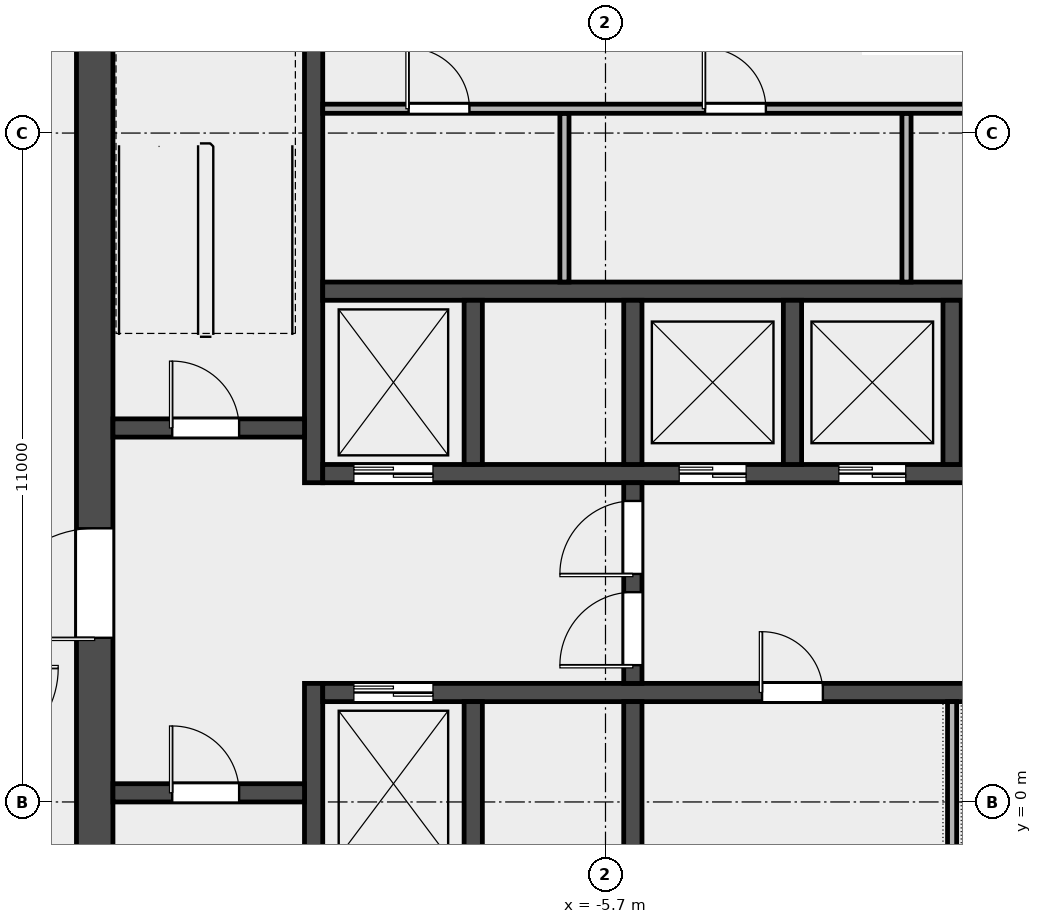
"""IFC4 building model, lengths in metres.
Left out: names, types, materials, properties, quantities, classifications, styles, units other than length and angle.
Written with IfcOpenShell. Run it as: python <this file> out.ifc"""

import sys

from ifc_helpers import new_model, si_unit, direction, frame, frame_2d, origin, place, context, subcontext, project, spatial, rectangle, extrude, element, fill, save


model = new_model("IFC4")
c1 = context("Model", 3, precision=1e-05, world=origin(), true_north=direction((0.0, 1.0)))
c2 = subcontext(c1, "Body", "Model", "MODEL_VIEW")
j1 = project(units=[si_unit("LENGTHUNIT", "METRE"), si_unit("PLANEANGLEUNIT", "RADIAN")], contexts=[c1])
p1 = place(None, origin())
s1 = spatial("IfcSite", under=j1, at=p1, CompositionType="ELEMENT")
p2 = place(p1, origin())
s2 = spatial("IfcBuilding", under=s1, at=p2, CompositionType="ELEMENT")
p3 = place(p2, frame((0.0, 0.0, 303.4)))
s3 = spatial("IfcBuildingStorey", under=s2, at=p3, CompositionType="ELEMENT", Elevation=303.4)
p4 = place(p3, frame((-14.1, -6.6, 0.0), z_axis=(0.0, 0.0, 1.0), x_axis=(0.0, 1.0, 0.0)))
e1 = element("IfcWall", 1, at=p4, inside=s3, PredefinedType="SHEAR", context=c2, shape_type="SweptSolid", body=[
    extrude(rectangle(XDim=19.5, YDim=0.6, at=frame_2d((9.75, 0.0))), origin(), (0.0, 0.0, 1.0), 3.7),
])
p5 = place(p4, frame((9.3, 0.0, 0.0)))
e2 = element("IfcOpeningElement", 2, at=p5, cuts=e1, PredefinedType="OPENING", context=c2, shape_type="SweptSolid", body=[
    extrude(rectangle(XDim=1.8, YDim=2.1, at=frame_2d((0.9, 1.05))), frame((0.0, 0.312, 0.0), z_axis=(0.0, -1.0, 0.0), x_axis=(1.0, 0.0, 0.0)), (0.0, 0.0, 1.0), 0.624),
])
p6 = place(p3, frame((-10.5, -6.6, 0.0), z_axis=(0.0, 0.0, 1.0), x_axis=(0.0, 1.0, 0.0)))
e3 = element("IfcWall", 3, at=p6, inside=s3, PredefinedType="SHEAR", context=c2, shape_type="SweptSolid", body=[
    extrude(rectangle(XDim=8.55, YDim=0.3, at=frame_2d((4.275, 0.0))), origin(), (0.0, 0.0, 1.0), 3.7),
])
p7 = place(p3, frame((-10.5, 5.25, 0.0), z_axis=(0.0, 0.0, 1.0), x_axis=(0.0, 1.0, 0.0)))
e4 = element("IfcWall", 4, at=p7, inside=s3, PredefinedType="SHEAR", context=c2, shape_type="SweptSolid", body=[
    extrude(rectangle(XDim=7.65, YDim=0.3, at=frame_2d((3.825, 0.0))), origin(), (0.0, 0.0, 1.0), 3.7),
])
p8 = place(p3, frame((-13.8, 0.15, 0.0), z_axis=(0.0, 0.0, 1.0), x_axis=(1.0, 0.0, 0.0)))
e5 = element("IfcWall", 5, at=p8, inside=s3, PredefinedType="SOLIDWALL", context=c2, shape_type="SweptSolid", body=[
    extrude(rectangle(XDim=3.15, YDim=0.3, at=frame_2d((1.575, 0.0))), origin(), (0.0, 0.0, 1.0), 3.7),
])
p9 = place(p8, frame((0.975, 0.0, 0.0)))
e6 = element("IfcOpeningElement", 6, at=p9, cuts=e5, PredefinedType="OPENING", context=c2, shape_type="SweptSolid", body=[
    extrude(rectangle(XDim=1.1, YDim=2.1, at=frame_2d((0.55, 1.05))), frame((0.0, 0.162, 0.0), z_axis=(0.0, -1.0, 0.0), x_axis=(1.0, 0.0, 0.0)), (0.0, 0.0, 1.0), 0.324),
])
p10 = place(p3, frame((-13.8, 6.15, 0.0), z_axis=(0.0, 0.0, 1.0), x_axis=(1.0, 0.0, 0.0)))
e7 = element("IfcWall", 7, at=p10, inside=s3, PredefinedType="SOLIDWALL", context=c2, shape_type="SweptSolid", body=[
    extrude(rectangle(XDim=3.15, YDim=0.3, at=frame_2d((1.575, 0.0))), origin(), (0.0, 0.0, 1.0), 3.7),
])
p11 = place(p10, frame((0.975, 0.0, 0.0)))
e8 = element("IfcOpeningElement", 8, at=p11, cuts=e7, PredefinedType="OPENING", context=c2, shape_type="SweptSolid", body=[
    extrude(rectangle(XDim=1.1, YDim=2.1, at=frame_2d((0.55, 1.05))), frame((0.0, 0.162, 0.0), z_axis=(0.0, -1.0, 0.0), x_axis=(1.0, 0.0, 0.0)), (0.0, 0.0, 1.0), 0.324),
])
p12 = place(p3, frame((-10.35, 1.8, 0.0), z_axis=(0.0, 0.0, 1.0), x_axis=(1.0, 0.0, 0.0)))
e9 = element("IfcWall", 9, at=p12, inside=s3, PredefinedType="SOLIDWALL", context=c2, shape_type="SweptSolid", body=[
    extrude(rectangle(XDim=20.7, YDim=0.3, at=frame_2d((10.35, 0.0))), origin(), (0.0, 0.0, 1.0), 3.7),
])
p13 = place(p12, frame((0.512, 0.0, 0.0)))
e10 = element("IfcOpeningElement", 10, at=p13, cuts=e9, PredefinedType="OPENING", context=c2, shape_type="SweptSolid", body=[
    extrude(rectangle(XDim=1.3, YDim=2.1, at=frame_2d((0.65, 1.05))), frame((0.0, 0.162, 0.0), z_axis=(0.0, -1.0, 0.0), x_axis=(1.0, 0.0, 0.0)), (0.0, 0.0, 1.0), 0.324),
])
p14 = place(p12, frame((7.225, 0.0, 0.0)))
e11 = element("IfcOpeningElement", 11, at=p14, cuts=e9, PredefinedType="OPENING", context=c2, shape_type="SweptSolid", body=[
    extrude(rectangle(XDim=1.0, YDim=2.1, at=frame_2d((0.5, 1.05))), frame((0.0, 0.162, 0.0), z_axis=(0.0, -1.0, 0.0), x_axis=(1.0, 0.0, 0.0)), (0.0, 0.0, 1.0), 0.324),
])
p15 = place(p12, frame((11.163, 0.0, 0.0)))
e12 = element("IfcOpeningElement", 12, at=p15, cuts=e9, PredefinedType="OPENING", context=c2, shape_type="SweptSolid", body=[
    extrude(rectangle(XDim=1.0, YDim=2.1, at=frame_2d((0.5, 1.05))), frame((0.0, 0.162, 0.0), z_axis=(0.0, -1.0, 0.0), x_axis=(1.0, 0.0, 0.0)), (0.0, 0.0, 1.0), 0.324),
])
p16 = place(p12, frame((16.413, 0.0, 0.0)))
e13 = element("IfcOpeningElement", 13, at=p16, cuts=e9, PredefinedType="OPENING", context=c2, shape_type="SweptSolid", body=[
    extrude(rectangle(XDim=1.0, YDim=2.1, at=frame_2d((0.5, 1.05))), frame((0.0, 0.162, 0.0), z_axis=(0.0, -1.0, 0.0), x_axis=(1.0, 0.0, 0.0)), (0.0, 0.0, 1.0), 0.324),
])
p17 = place(p3, frame((-10.35, 5.4, 0.0), z_axis=(0.0, 0.0, 1.0), x_axis=(1.0, 0.0, 0.0)))
e14 = element("IfcWall", 14, at=p17, inside=s3, PredefinedType="SOLIDWALL", context=c2, shape_type="SweptSolid", body=[
    extrude(rectangle(XDim=20.7, YDim=0.3, at=frame_2d((10.35, 0.0))), origin(), (0.0, 0.0, 1.0), 3.7),
])
p18 = place(p17, frame((0.512, 0.0, 0.0)))
e15 = element("IfcOpeningElement", 15, at=p18, cuts=e14, PredefinedType="OPENING", context=c2, shape_type="SweptSolid", body=[
    extrude(rectangle(XDim=1.3, YDim=2.1, at=frame_2d((0.65, 1.05))), frame((0.0, 0.162, 0.0), z_axis=(0.0, -1.0, 0.0), x_axis=(1.0, 0.0, 0.0)), (0.0, 0.0, 1.0), 0.324),
])
p19 = place(p17, frame((5.863, 0.0, 0.0)))
e16 = element("IfcOpeningElement", 16, at=p19, cuts=e14, PredefinedType="OPENING", context=c2, shape_type="SweptSolid", body=[
    extrude(rectangle(XDim=1.1, YDim=2.1, at=frame_2d((0.55, 1.05))), frame((0.0, 0.162, 0.0), z_axis=(0.0, -1.0, 0.0), x_axis=(1.0, 0.0, 0.0)), (0.0, 0.0, 1.0), 0.324),
])
p20 = place(p17, frame((8.488, 0.0, 0.0)))
e17 = element("IfcOpeningElement", 17, at=p20, cuts=e14, PredefinedType="OPENING", context=c2, shape_type="SweptSolid", body=[
    extrude(rectangle(XDim=1.1, YDim=2.1, at=frame_2d((0.55, 1.05))), frame((0.0, 0.162, 0.0), z_axis=(0.0, -1.0, 0.0), x_axis=(1.0, 0.0, 0.0)), (0.0, 0.0, 1.0), 0.324),
])
p21 = place(p17, frame((11.113, 0.0, 0.0)))
e18 = element("IfcOpeningElement", 18, at=p21, cuts=e14, PredefinedType="OPENING", context=c2, shape_type="SweptSolid", body=[
    extrude(rectangle(XDim=1.1, YDim=2.1, at=frame_2d((0.55, 1.05))), frame((0.0, 0.162, 0.0), z_axis=(0.0, -1.0, 0.0), x_axis=(1.0, 0.0, 0.0)), (0.0, 0.0, 1.0), 0.324),
])
p22 = place(p17, frame((13.738, 0.0, 0.0)))
e19 = element("IfcOpeningElement", 19, at=p22, cuts=e14, PredefinedType="OPENING", context=c2, shape_type="SweptSolid", body=[
    extrude(rectangle(XDim=1.1, YDim=2.1, at=frame_2d((0.55, 1.05))), frame((0.0, 0.162, 0.0), z_axis=(0.0, -1.0, 0.0), x_axis=(1.0, 0.0, 0.0)), (0.0, 0.0, 1.0), 0.324),
])
p23 = place(p17, frame((16.363, 0.0, 0.0)))
e20 = element("IfcOpeningElement", 20, at=p23, cuts=e14, PredefinedType="OPENING", context=c2, shape_type="SweptSolid", body=[
    extrude(rectangle(XDim=1.1, YDim=2.1, at=frame_2d((0.55, 1.05))), frame((0.0, 0.162, 0.0), z_axis=(0.0, -1.0, 0.0), x_axis=(1.0, 0.0, 0.0)), (0.0, 0.0, 1.0), 0.324),
])
p24 = place(p17, frame((18.988, 0.0, 0.0)))
e21 = element("IfcOpeningElement", 21, at=p24, cuts=e14, PredefinedType="OPENING", context=c2, shape_type="SweptSolid", body=[
    extrude(rectangle(XDim=1.1, YDim=2.1, at=frame_2d((0.55, 1.05))), frame((0.0, 0.162, 0.0), z_axis=(0.0, -1.0, 0.0), x_axis=(1.0, 0.0, 0.0)), (0.0, 0.0, 1.0), 0.324),
])
p25 = place(p3, frame((-10.35, 8.4, 0.0), z_axis=(0.0, 0.0, 1.0), x_axis=(1.0, 0.0, 0.0)))
e22 = element("IfcWall", 22, at=p25, inside=s3, PredefinedType="SOLIDWALL", context=c2, shape_type="SweptSolid", body=[
    extrude(rectangle(XDim=20.7, YDim=0.3, at=frame_2d((10.35, 0.0))), origin(), (0.0, 0.0, 1.0), 3.7),
])
for number, where, z_axis, x_axis in (
    (23, (-7.875, -1.05, 0.0), (0.0, 0.0, 1.0), (0.0, 1.0, 0.0)),
    (24, (-5.25, -1.05, 0.0), (0.0, 0.0, 1.0), (0.0, 1.0, 0.0)),
    (25, (-7.875, 5.55, 0.0), (0.0, 0.0, 1.0), (0.0, 1.0, 0.0)),
    (26, (-5.25, 5.55, 0.0), (0.0, 0.0, 1.0), (0.0, 1.0, 0.0)),
    (27, (-2.625, 5.55, 0.0), (0.0, 0.0, 1.0), (0.0, 1.0, 0.0)),
    (28, (0.0, 5.55, 0.0), (0.0, 0.0, 1.0), (0.0, 1.0, 0.0)),
):
    element("IfcWall", number, at=place(p3, frame(where, z_axis=z_axis, x_axis=x_axis)), inside=s3, PredefinedType="SOLIDWALL", context=c2, shape_type="SweptSolid", body=[
        extrude(rectangle(XDim=2.7, YDim=0.3, at=frame_2d((1.35, 0.0))), origin(), (0.0, 0.0, 1.0), 3.7),
    ])
p26 = place(p3, frame((-5.25, 1.95, 0.0), z_axis=(0.0, 0.0, 1.0), x_axis=(0.0, 1.0, 0.0)))
e29 = element("IfcWall", 29, at=p26, inside=s3, PredefinedType="SOLIDWALL", context=c2, shape_type="SweptSolid", body=[
    extrude(rectangle(XDim=3.3, YDim=0.3, at=frame_2d((1.65, 0.0))), origin(), (0.0, 0.0, 1.0), 3.7),
])
p27 = place(p26, frame((0.3, 0.0, 0.0)))
e30 = element("IfcOpeningElement", 30, at=p27, cuts=e29, PredefinedType="OPENING", context=c2, shape_type="SweptSolid", body=[
    extrude(rectangle(XDim=1.2, YDim=2.1, at=frame_2d((0.6, 1.05))), frame((0.0, 0.162, 0.0), z_axis=(0.0, -1.0, 0.0), x_axis=(1.0, 0.0, 0.0)), (0.0, 0.0, 1.0), 0.324),
])
p28 = place(p26, frame((1.8, 0.0, 0.0)))
e31 = element("IfcOpeningElement", 31, at=p28, cuts=e29, PredefinedType="OPENING", context=c2, shape_type="SweptSolid", body=[
    extrude(rectangle(XDim=1.2, YDim=2.1, at=frame_2d((0.6, 1.05))), frame((0.0, 0.162, 0.0), z_axis=(0.0, -1.0, 0.0), x_axis=(1.0, 0.0, 0.0)), (0.0, 0.0, 1.0), 0.324),
])
for number, where, z_axis, x_axis in (
    (32, (-6.375, 8.55, 0.0), (0.0, 0.0, 1.0), (0.0, 1.0, 0.0)),
    (33, (-0.75, 8.55, 0.0), (0.0, 0.0, 1.0), (0.0, 1.0, 0.0)),
):
    element("IfcWall", number, at=place(p3, frame(where, z_axis=z_axis, x_axis=x_axis)), inside=s3, PredefinedType="PARTITIONING", context=c2, shape_type="SweptSolid", body=[
        extrude(rectangle(XDim=2.775, YDim=0.15, at=frame_2d((1.387, 0.0))), origin(), (0.0, 0.0, 1.0), 3.7),
    ])
p29 = place(p3, frame((-10.35, 11.4, 0.0), z_axis=(0.0, 0.0, 1.0), x_axis=(1.0, 0.0, 0.0)))
e34 = element("IfcWall", 34, at=p29, inside=s3, PredefinedType="PARTITIONING", context=c2, shape_type="SweptSolid", body=[
    extrude(rectangle(XDim=20.7, YDim=0.15, at=frame_2d((10.35, 0.0))), origin(), (0.0, 0.0, 1.0), 3.7),
])
p30 = place(p29, frame((1.413, 0.0, 0.0)))
e35 = element("IfcOpeningElement", 35, at=p30, cuts=e34, PredefinedType="OPENING", context=c2, shape_type="SweptSolid", body=[
    extrude(rectangle(XDim=1.0, YDim=2.1, at=frame_2d((0.5, 1.05))), frame((0.0, 0.087, 0.0), z_axis=(0.0, -1.0, 0.0), x_axis=(1.0, 0.0, 0.0)), (0.0, 0.0, 1.0), 0.174),
])
p31 = place(p29, frame((6.288, 0.0, 0.0)))
e36 = element("IfcOpeningElement", 36, at=p31, cuts=e34, PredefinedType="OPENING", context=c2, shape_type="SweptSolid", body=[
    extrude(rectangle(XDim=1.0, YDim=2.1, at=frame_2d((0.5, 1.05))), frame((0.0, 0.087, 0.0), z_axis=(0.0, -1.0, 0.0), x_axis=(1.0, 0.0, 0.0)), (0.0, 0.0, 1.0), 0.174),
])
p32 = place(p29, frame((11.913, 0.0, 0.0)))
e37 = element("IfcOpeningElement", 37, at=p32, cuts=e34, PredefinedType="OPENING", context=c2, shape_type="SweptSolid", body=[
    extrude(rectangle(XDim=1.0, YDim=2.1, at=frame_2d((0.5, 1.05))), frame((0.0, 0.087, 0.0), z_axis=(0.0, -1.0, 0.0), x_axis=(1.0, 0.0, 0.0)), (0.0, 0.0, 1.0), 0.174),
])
p33 = place(p29, frame((17.538, 0.0, 0.0)))
e38 = element("IfcOpeningElement", 38, at=p33, cuts=e34, PredefinedType="OPENING", context=c2, shape_type="SweptSolid", body=[
    extrude(rectangle(XDim=1.0, YDim=2.1, at=frame_2d((0.5, 1.05))), frame((0.0, 0.087, 0.0), z_axis=(0.0, -1.0, 0.0), x_axis=(1.0, 0.0, 0.0)), (0.0, 0.0, 1.0), 0.174),
])
p34 = place(p3, frame((0.0, -1.05, 0.0), z_axis=(0.0, 0.0, 1.0), x_axis=(0.0, 1.0, 0.0)))
e39 = element("IfcWall", 39, at=p34, inside=s3, PredefinedType="PARTITIONING", context=c2, shape_type="SweptSolid", body=[
    extrude(rectangle(XDim=2.7, YDim=0.15, at=frame_2d((1.35, 0.0))), origin(), (0.0, 0.0, 1.0), 3.7),
])
p35 = place(p9, origin())
e40 = element("IfcDoor", 40, at=p35, inside=s3, OperationType="SINGLE_SWING_LEFT", PredefinedType="DOOR", context=c2, shape_type="SweptSolid", body=[
    extrude(rectangle(XDim=1.1, YDim=2.1, at=frame_2d((0.55, 1.05))), frame((0.0, 0.025, 0.0), z_axis=(0.0, -1.0, 0.0), x_axis=(1.0, 0.0, 0.0)), (0.0, 0.0, 1.0), 0.05),
])
fill(e6, e40)
p36 = place(p11, origin())
e41 = element("IfcDoor", 41, at=p36, inside=s3, OperationType="SINGLE_SWING_LEFT", PredefinedType="DOOR", context=c2, shape_type="SweptSolid", body=[
    extrude(rectangle(XDim=1.1, YDim=2.1, at=frame_2d((0.55, 1.05))), frame((0.0, 0.025, 0.0), z_axis=(0.0, -1.0, 0.0), x_axis=(1.0, 0.0, 0.0)), (0.0, 0.0, 1.0), 0.05),
])
fill(e8, e41)
p37 = place(p5, origin())
e42 = element("IfcDoor", 42, at=p37, inside=s3, OperationType="DOUBLE_DOOR_SINGLE_SWING", PredefinedType="DOOR", context=c2, shape_type="SweptSolid", body=[
    extrude(rectangle(XDim=1.8, YDim=2.1, at=frame_2d((0.9, 1.05))), frame((0.0, 0.025, 0.0), z_axis=(0.0, -1.0, 0.0), x_axis=(1.0, 0.0, 0.0)), (0.0, 0.0, 1.0), 0.05),
])
fill(e2, e42)
p38 = place(p27, origin())
e43 = element("IfcDoor", 43, at=p38, inside=s3, OperationType="SINGLE_SWING_LEFT", PredefinedType="DOOR", context=c2, shape_type="SweptSolid", body=[
    extrude(rectangle(XDim=1.2, YDim=2.1, at=frame_2d((0.6, 1.05))), frame((0.0, 0.025, 0.0), z_axis=(0.0, -1.0, 0.0), x_axis=(1.0, 0.0, 0.0)), (0.0, 0.0, 1.0), 0.05),
])
fill(e30, e43)
p39 = place(p28, origin())
e44 = element("IfcDoor", 44, at=p39, inside=s3, OperationType="SINGLE_SWING_RIGHT", PredefinedType="DOOR", context=c2, shape_type="SweptSolid", body=[
    extrude(rectangle(XDim=1.2, YDim=2.1, at=frame_2d((0.6, 1.05))), frame((0.0, 0.025, 0.0), z_axis=(0.0, -1.0, 0.0), x_axis=(1.0, 0.0, 0.0)), (0.0, 0.0, 1.0), 0.05),
])
fill(e31, e44)
p40 = place(p13, origin())
e45 = element("IfcDoor", 45, at=p40, inside=s3, OperationType="DOUBLE_DOOR_SLIDING", PredefinedType="DOOR", context=c2, shape_type="SweptSolid", body=[
    extrude(rectangle(XDim=1.3, YDim=2.1, at=frame_2d((0.65, 1.05))), frame((0.0, 0.025, 0.0), z_axis=(0.0, -1.0, 0.0), x_axis=(1.0, 0.0, 0.0)), (0.0, 0.0, 1.0), 0.05),
])
fill(e10, e45)
p41 = place(p18, origin())
e46 = element("IfcDoor", 46, at=p41, inside=s3, OperationType="DOUBLE_DOOR_SLIDING", PredefinedType="DOOR", context=c2, shape_type="SweptSolid", body=[
    extrude(rectangle(XDim=1.3, YDim=2.1, at=frame_2d((0.65, 1.05))), frame((0.0, 0.025, 0.0), z_axis=(0.0, -1.0, 0.0), x_axis=(1.0, 0.0, 0.0)), (0.0, 0.0, 1.0), 0.05),
])
fill(e15, e46)
p42 = place(p19, origin())
e47 = element("IfcDoor", 47, at=p42, inside=s3, OperationType="DOUBLE_DOOR_SLIDING", PredefinedType="DOOR", context=c2, shape_type="SweptSolid", body=[
    extrude(rectangle(XDim=1.1, YDim=2.1, at=frame_2d((0.55, 1.05))), frame((0.0, 0.025, 0.0), z_axis=(0.0, -1.0, 0.0), x_axis=(1.0, 0.0, 0.0)), (0.0, 0.0, 1.0), 0.05),
])
fill(e16, e47)
p43 = place(p20, origin())
e48 = element("IfcDoor", 48, at=p43, inside=s3, OperationType="DOUBLE_DOOR_SLIDING", PredefinedType="DOOR", context=c2, shape_type="SweptSolid", body=[
    extrude(rectangle(XDim=1.1, YDim=2.1, at=frame_2d((0.55, 1.05))), frame((0.0, 0.025, 0.0), z_axis=(0.0, -1.0, 0.0), x_axis=(1.0, 0.0, 0.0)), (0.0, 0.0, 1.0), 0.05),
])
fill(e17, e48)
p44 = place(p30, origin())
e49 = element("IfcDoor", 49, at=p44, inside=s3, OperationType="SINGLE_SWING_LEFT", PredefinedType="DOOR", context=c2, shape_type="SweptSolid", body=[
    extrude(rectangle(XDim=1.0, YDim=2.1, at=frame_2d((0.5, 1.05))), frame((0.0, 0.025, 0.0), z_axis=(0.0, -1.0, 0.0), x_axis=(1.0, 0.0, 0.0)), (0.0, 0.0, 1.0), 0.05),
])
fill(e35, e49)
p45 = place(p31, origin())
e50 = element("IfcDoor", 50, at=p45, inside=s3, OperationType="SINGLE_SWING_LEFT", PredefinedType="DOOR", context=c2, shape_type="SweptSolid", body=[
    extrude(rectangle(XDim=1.0, YDim=2.1, at=frame_2d((0.5, 1.05))), frame((0.0, 0.025, 0.0), z_axis=(0.0, -1.0, 0.0), x_axis=(1.0, 0.0, 0.0)), (0.0, 0.0, 1.0), 0.05),
])
fill(e36, e50)
p46 = place(p14, origin())
e51 = element("IfcDoor", 51, at=p46, inside=s3, OperationType="SINGLE_SWING_LEFT", PredefinedType="DOOR", context=c2, shape_type="SweptSolid", body=[
    extrude(rectangle(XDim=1.0, YDim=2.1, at=frame_2d((0.5, 1.05))), frame((0.0, 0.025, 0.0), z_axis=(0.0, -1.0, 0.0), x_axis=(1.0, 0.0, 0.0)), (0.0, 0.0, 1.0), 0.05),
])
fill(e11, e51)
save(model, sys.argv[1])
